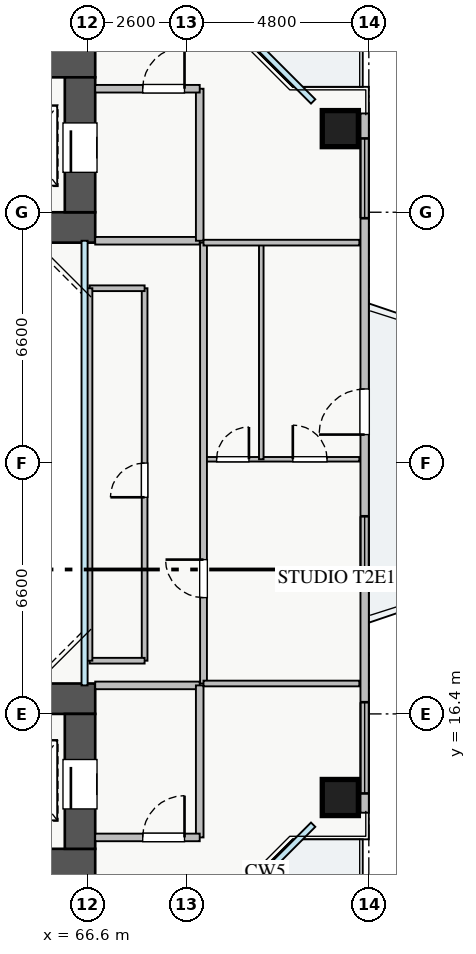
"""IFC4 building model, lengths in metres.
Left out: names, types, materials, properties, quantities, classifications, styles, units other than length and angle.
Written with IfcOpenShell. Run it as: python <this file> out.ifc"""

import sys

from ifc_helpers import new_model, si_unit, direction, frame, frame_2d, origin, origin_2d, place, context, subcontext, project, spatial, rectangle, extrude, source, transform, mapped, element, fill, save


model = new_model("IFC4")
c1 = context("Model", 3, precision=1e-05, world=origin(), true_north=direction((0.0, 1.0)))
c2 = subcontext(c1, "Body", "Model", "MODEL_VIEW")
j1 = project(units=[si_unit("LENGTHUNIT", "METRE"), si_unit("PLANEANGLEUNIT", "RADIAN")], contexts=[c1])
p1 = place(None, origin())
s1 = spatial("IfcSite", under=j1, at=p1, CompositionType="ELEMENT")
p2 = place(p1, origin())
s2 = spatial("IfcBuilding", under=s1, at=p2, CompositionType="ELEMENT")
p3 = place(p2, frame((0.0, 0.0, 23.0)))
s3 = spatial("IfcBuildingStorey", under=s2, at=p3, CompositionType="ELEMENT", Elevation=23.0)
p4 = place(p3, frame((54.2, 29.2, 0.0), z_axis=(0.0, 0.0, 1.0), x_axis=(1.0, 0.0, 0.0)))
e1 = element("IfcWall", 1, at=p4, inside=s3, PredefinedType="SHEAR", context=c2, shape_type="SweptSolid", body=[
    extrude(rectangle(XDim=12.6, YDim=0.8, at=frame_2d((6.3, 0.0))), origin(), (0.0, 0.0, 1.0), 3.25),
])
p5 = place(p3, frame((54.2, 33.55, 0.0), z_axis=(0.0, 0.0, 1.0), x_axis=(1.0, 0.0, 0.0)))
e2 = element("IfcWall", 2, at=p5, inside=s3, PredefinedType="SHEAR", context=c2, shape_type="SweptSolid", body=[
    extrude(rectangle(XDim=12.6, YDim=0.8, at=frame_2d((6.3, 0.0))), origin(), (0.0, 0.0, 1.0), 3.25),
])
p6 = place(p5, frame((8.2, 0.0, 0.0)))
e3 = element("IfcOpeningElement", 3, at=p6, cuts=e2, PredefinedType="OPENING", context=c2, shape_type="SweptSolid", body=[
    extrude(rectangle(XDim=1.1, YDim=2.05, at=frame_2d((0.55, 1.025))), frame((0.0, 0.41, 0.0), z_axis=(0.0, -1.0, 0.0), x_axis=(1.0, 0.0, 0.0)), (0.0, 0.0, 1.0), 0.82),
])
p7 = place(p3, frame((66.4, 29.6, 0.0), z_axis=(0.0, 0.0, 1.0), x_axis=(0.0, 1.0, 0.0)))
e4 = element("IfcWall", 4, at=p7, inside=s3, PredefinedType="SHEAR", context=c2, shape_type="SweptSolid", body=[
    extrude(rectangle(XDim=3.55, YDim=0.8, at=frame_2d((1.775, 0.0))), origin(), (0.0, 0.0, 1.0), 3.25),
])
p8 = place(p7, frame((1.05, 0.0, 0.0)))
e5 = element("IfcOpeningElement", 5, at=p8, cuts=e4, PredefinedType="OPENING", context=c2, shape_type="SweptSolid", body=[
    extrude(rectangle(XDim=1.3, YDim=2.05, at=frame_2d((0.65, 1.025))), frame((0.0, 0.41, 0.0), z_axis=(0.0, -1.0, 0.0), x_axis=(1.0, 0.0, 0.0)), (0.0, 0.0, 1.0), 0.82),
])
p9 = place(p3, frame((54.2, 12.45, 0.0), z_axis=(0.0, 0.0, 1.0), x_axis=(1.0, 0.0, 0.0)))
e6 = element("IfcWall", 6, at=p9, inside=s3, PredefinedType="SHEAR", context=c2, shape_type="SweptSolid", body=[
    extrude(rectangle(XDim=12.6, YDim=0.8, at=frame_2d((6.3, 0.0))), origin(), (0.0, 0.0, 1.0), 3.25),
])
p10 = place(p9, frame((8.2, 0.0, 0.0)))
e7 = element("IfcOpeningElement", 7, at=p10, cuts=e6, PredefinedType="OPENING", context=c2, shape_type="SweptSolid", body=[
    extrude(rectangle(XDim=1.1, YDim=2.05, at=frame_2d((0.55, 1.025))), frame((0.0, 0.41, 0.0), z_axis=(0.0, -1.0, 0.0), x_axis=(1.0, 0.0, 0.0)), (0.0, 0.0, 1.0), 0.82),
])
p11 = place(p3, frame((54.2, 16.8, 0.0), z_axis=(0.0, 0.0, 1.0), x_axis=(1.0, 0.0, 0.0)))
e8 = element("IfcWall", 8, at=p11, inside=s3, PredefinedType="SHEAR", context=c2, shape_type="SweptSolid", body=[
    extrude(rectangle(XDim=12.6, YDim=0.8, at=frame_2d((6.3, 0.0))), origin(), (0.0, 0.0, 1.0), 3.25),
])
p12 = place(p3, frame((66.4, 12.85, 0.0), z_axis=(0.0, 0.0, 1.0), x_axis=(0.0, 1.0, 0.0)))
e9 = element("IfcWall", 9, at=p12, inside=s3, PredefinedType="SHEAR", context=c2, shape_type="SweptSolid", body=[
    extrude(rectangle(XDim=3.55, YDim=0.8, at=frame_2d((1.775, 0.0))), origin(), (0.0, 0.0, 1.0), 3.25),
])
p13 = place(p12, frame((1.05, 0.0, 0.0)))
e10 = element("IfcOpeningElement", 10, at=p13, cuts=e9, PredefinedType="OPENING", context=c2, shape_type="SweptSolid", body=[
    extrude(rectangle(XDim=1.3, YDim=2.05, at=frame_2d((0.65, 1.025))), frame((0.0, 0.41, 0.0), z_axis=(0.0, -1.0, 0.0), x_axis=(1.0, 0.0, 0.0)), (0.0, 0.0, 1.0), 0.82),
])
m1 = source(origin(), c2, "Body", "SweptSolid", [
    extrude(rectangle(XDim=0.95, YDim=0.95, at=origin_2d()), origin(), (0.0, 0.0, 1.0), 3.25),
])
for number, where, z_axis, x_axis in (
    (11, (73.25, 14.2, 0.0), (0.0, 0.0, 1.0), (1.0, 0.0, 0.0)),
    (12, (73.25, 31.8, 0.0), (0.0, 0.0, 1.0), (1.0, 0.0, 0.0)),
):
    element("IfcColumn", number, at=place(p3, frame(where, z_axis=z_axis, x_axis=x_axis)), inside=s3, PredefinedType="COLUMN", context=c2, shape_type="MappedRepresentation", body=[
        mapped(m1, transform((0.0, 0.0, 0.0), x_axis=(1.0, 0.0, 0.0), y_axis=(0.0, 1.0, 0.0), z_axis=(0.0, 0.0, 1.0), scale=1.0)),
    ])
p14 = place(p3, frame((73.89, 13.8, 0.0), z_axis=(0.0, 0.0, 1.0), x_axis=(0.0, 1.0, 0.0)))
e13 = element("IfcWall", 13, at=p14, inside=s3, PredefinedType="STANDARD", context=c2, shape_type="SweptSolid", body=[
    extrude(rectangle(XDim=18.4, YDim=0.22, at=frame_2d((9.2, 0.0))), origin(), (0.0, 0.0, 1.0), 2.61),
])
p15 = place(p14, frame((9.95, 0.0, 0.0)))
e14 = element("IfcOpeningElement", 14, at=p15, cuts=e13, PredefinedType="OPENING", context=c2, shape_type="SweptSolid", body=[
    extrude(rectangle(XDim=1.2, YDim=2.1, at=frame_2d((0.6, 1.05))), frame((0.0, 0.12, 0.0), z_axis=(0.0, -1.0, 0.0), x_axis=(1.0, 0.0, 0.0)), (0.0, 0.0, 1.0), 0.24),
])
p16 = place(p14, frame((0.508, 0.0, 0.9)))
e15 = element("IfcOpeningElement", 15, at=p16, cuts=e13, PredefinedType="OPENING", context=c2, shape_type="SweptSolid", body=[
    extrude(rectangle(XDim=2.4, YDim=1.5, at=frame_2d((1.2, 0.75))), frame((0.0, 0.12, 0.0), z_axis=(0.0, -1.0, 0.0), x_axis=(1.0, 0.0, 0.0)), (0.0, 0.0, 1.0), 0.24),
])
p17 = place(p14, frame((6.0, 0.0, 0.9)))
e16 = element("IfcOpeningElement", 16, at=p17, cuts=e13, PredefinedType="OPENING", context=c2, shape_type="SweptSolid", body=[
    extrude(rectangle(XDim=1.8, YDim=1.45, at=frame_2d((0.9, 0.725))), frame((0.0, 0.12, 0.0), z_axis=(0.0, -1.0, 0.0), x_axis=(1.0, 0.0, 0.0)), (0.0, 0.0, 1.0), 0.24),
])
p18 = place(p14, frame((15.643, 0.0, 0.9)))
e17 = element("IfcOpeningElement", 17, at=p18, cuts=e13, PredefinedType="OPENING", context=c2, shape_type="SweptSolid", body=[
    extrude(rectangle(XDim=2.1, YDim=1.5, at=frame_2d((1.05, 0.75))), frame((0.0, 0.12, 0.0), z_axis=(0.0, -1.0, 0.0), x_axis=(1.0, 0.0, 0.0)), (0.0, 0.0, 1.0), 0.24),
])
p19 = place(p3, frame((66.8, 28.85, 0.0), z_axis=(0.0, 0.0, 1.0), x_axis=(1.0, 0.0, 0.0)))
e18 = element("IfcWall", 18, at=p19, inside=s3, PredefinedType="PARTITIONING", context=c2, shape_type="SweptSolid", body=[
    extrude(rectangle(XDim=2.75, YDim=0.2, at=frame_2d((1.375, 0.0))), origin(), (0.0, 0.0, 1.0), 3.07),
])
p20 = place(p3, frame((69.55, 28.85, 0.0), z_axis=(0.0, 0.0, 1.0), x_axis=(0.0, 1.0, 0.0)))
e19 = element("IfcWall", 19, at=p20, inside=s3, PredefinedType="PARTITIONING", context=c2, shape_type="SweptSolid", body=[
    extrude(rectangle(XDim=4.0, YDim=0.2, at=frame_2d((2.0, 0.0))), origin(), (0.0, 0.0, 1.0), 2.615),
])
p21 = place(p3, frame((66.8, 32.85, 0.0), z_axis=(0.0, 0.0, 1.0), x_axis=(1.0, 0.0, 0.0)))
e20 = element("IfcWall", 20, at=p21, inside=s3, PredefinedType="PARTITIONING", context=c2, shape_type="SweptSolid", body=[
    extrude(rectangle(XDim=2.75, YDim=0.2, at=frame_2d((1.375, 0.0))), origin(), (0.0, 0.0, 1.0), 3.07),
])
p22 = place(p21, frame((1.25, 0.0, 0.0)))
e21 = element("IfcOpeningElement", 21, at=p22, cuts=e20, PredefinedType="OPENING", context=c2, shape_type="SweptSolid", body=[
    extrude(rectangle(XDim=1.1, YDim=2.05, at=frame_2d((0.55, 1.025))), frame((0.0, 0.11, 0.0), z_axis=(0.0, -1.0, 0.0), x_axis=(1.0, 0.0, 0.0)), (0.0, 0.0, 1.0), 0.22),
])
p23 = place(p3, frame((66.8, 17.15, 0.0), z_axis=(0.0, 0.0, 1.0), x_axis=(1.0, 0.0, 0.0)))
e22 = element("IfcWall", 22, at=p23, inside=s3, PredefinedType="PARTITIONING", context=c2, shape_type="SweptSolid", body=[
    extrude(rectangle(XDim=2.75, YDim=0.2, at=frame_2d((1.375, 0.0))), origin(), (0.0, 0.0, 1.0), 3.07),
])
p24 = place(p3, frame((69.55, 13.15, 0.0), z_axis=(0.0, 0.0, 1.0), x_axis=(0.0, 1.0, 0.0)))
e23 = element("IfcWall", 23, at=p24, inside=s3, PredefinedType="PARTITIONING", context=c2, shape_type="SweptSolid", body=[
    extrude(rectangle(XDim=4.0, YDim=0.2, at=frame_2d((2.0, 0.0))), origin(), (0.0, 0.0, 1.0), 2.615),
])
p25 = place(p3, frame((66.8, 13.15, 0.0), z_axis=(0.0, 0.0, 1.0), x_axis=(1.0, 0.0, 0.0)))
e24 = element("IfcWall", 24, at=p25, inside=s3, PredefinedType="PARTITIONING", context=c2, shape_type="SweptSolid", body=[
    extrude(rectangle(XDim=2.75, YDim=0.2, at=frame_2d((1.375, 0.0))), origin(), (0.0, 0.0, 1.0), 3.07),
])
p26 = place(p25, frame((1.25, 0.0, 0.0)))
e25 = element("IfcOpeningElement", 25, at=p26, cuts=e24, PredefinedType="OPENING", context=c2, shape_type="SweptSolid", body=[
    extrude(rectangle(XDim=1.1, YDim=2.05, at=frame_2d((0.55, 1.025))), frame((0.0, 0.11, 0.0), z_axis=(0.0, -1.0, 0.0), x_axis=(1.0, 0.0, 0.0)), (0.0, 0.0, 1.0), 0.22),
])
p27 = place(p3, frame((69.65, 23.1, 0.0), z_axis=(0.0, 0.0, 1.0), x_axis=(1.0, 0.0, 0.0)))
e26 = element("IfcWall", 26, at=p27, inside=s3, PredefinedType="PLUMBINGWALL", context=c2, shape_type="SweptSolid", body=[
    extrude(rectangle(XDim=4.1, YDim=0.12, at=frame_2d((2.05, 0.0))), origin(), (0.0, 0.0, 1.0), 2.771),
])
p28 = place(p27, frame((0.345, 0.0, 0.0)))
e27 = element("IfcOpeningElement", 27, at=p28, cuts=e26, PredefinedType="OPENING", context=c2, shape_type="SweptSolid", body=[
    extrude(rectangle(XDim=0.85, YDim=2.05, at=frame_2d((0.425, 1.025))), frame((0.0, 0.07, 0.0), z_axis=(0.0, -1.0, 0.0), x_axis=(1.0, 0.0, 0.0)), (0.0, 0.0, 1.0), 0.14),
])
p29 = place(p27, frame((2.35, 0.0, 0.0)))
e28 = element("IfcOpeningElement", 28, at=p29, cuts=e26, PredefinedType="OPENING", context=c2, shape_type="SweptSolid", body=[
    extrude(rectangle(XDim=0.9, YDim=2.05, at=frame_2d((0.45, 1.025))), frame((0.0, 0.07, 0.0), z_axis=(0.0, -1.0, 0.0), x_axis=(1.0, 0.0, 0.0)), (0.0, 0.0, 1.0), 0.14),
])
p30 = place(p3, frame((71.17, 23.1, 0.0), z_axis=(0.0, 0.0, 1.0), x_axis=(0.0, 1.0, 0.0)))
e29 = element("IfcWall", 29, at=p30, inside=s3, PredefinedType="PLUMBINGWALL", context=c2, shape_type="SweptSolid", body=[
    extrude(rectangle(XDim=5.7, YDim=0.12, at=frame_2d((2.85, 0.0))), origin(), (0.0, 0.0, 1.0), 3.07),
])
p31 = place(p3, frame((69.65, 17.2, 0.0), z_axis=(0.0, 0.0, 1.0), x_axis=(0.0, 1.0, 0.0)))
e30 = element("IfcWall", 30, at=p31, inside=s3, PredefinedType="PARTITIONING", context=c2, shape_type="SweptSolid", body=[
    extrude(rectangle(XDim=11.6, YDim=0.18, at=frame_2d((5.8, 0.0))), origin(), (0.0, 0.0, 1.0), 3.07),
])
p32 = place(p31, frame((2.26, 0.0, 0.0)))
e31 = element("IfcOpeningElement", 31, at=p32, cuts=e30, PredefinedType="OPENING", context=c2, shape_type="SweptSolid", body=[
    extrude(rectangle(XDim=1.0, YDim=2.05, at=frame_2d((0.5, 1.025))), frame((0.0, 0.1, 0.0), z_axis=(0.0, -1.0, 0.0), x_axis=(1.0, 0.0, 0.0)), (0.0, 0.0, 1.0), 0.2),
])
for number, where, z_axis, x_axis in (
    (32, (69.65, 17.2, 0.0), (0.0, 0.0, 1.0), (1.0, 0.0, 0.0)),
    (33, (69.65, 28.8, 0.0), (0.0, 0.0, 1.0), (1.0, 0.0, 0.0)),
):
    element("IfcWall", number, at=place(p3, frame(where, z_axis=z_axis, x_axis=x_axis)), inside=s3, PredefinedType="PARTITIONING", context=c2, shape_type="SweptSolid", body=[
        extrude(rectangle(XDim=4.1, YDim=0.15, at=frame_2d((2.05, 0.0))), origin(), (0.0, 0.0, 1.0), 3.07),
    ])
p33 = place(p3, frame((68.1, 17.8, 0.0), z_axis=(0.0, 0.0, 1.0), x_axis=(0.0, 1.0, 0.0)))
e34 = element("IfcWall", 34, at=p33, inside=s3, PredefinedType="PARTITIONING", context=c2, shape_type="SweptSolid", body=[
    extrude(rectangle(XDim=9.8, YDim=0.15, at=frame_2d((4.9, 0.0))), origin(), (0.0, 0.0, 1.0), 3.07),
])
p34 = place(p33, frame((4.3, 0.0, 0.0)))
e35 = element("IfcOpeningElement", 35, at=p34, cuts=e34, PredefinedType="OPENING", context=c2, shape_type="SweptSolid", body=[
    extrude(rectangle(XDim=0.9, YDim=2.05, at=frame_2d((0.45, 1.025))), frame((0.0, 0.085, 0.0), z_axis=(0.0, -1.0, 0.0), x_axis=(1.0, 0.0, 0.0)), (0.0, 0.0, 1.0), 0.17),
])
p35 = place(p3, frame((66.65, 27.6, 0.0), z_axis=(0.0, 0.0, 1.0), x_axis=(1.0, 0.0, 0.0)))
e36 = element("IfcWall", 36, at=p35, inside=s3, PredefinedType="PARTITIONING", context=c2, shape_type="SweptSolid", body=[
    extrude(rectangle(XDim=1.45, YDim=0.15, at=frame_2d((0.725, 0.0))), origin(), (0.0, 0.0, 1.0), 2.771),
])
p36 = place(p3, frame((66.65, 17.8, 0.0), z_axis=(0.0, 0.0, 1.0), x_axis=(1.0, 0.0, 0.0)))
e37 = element("IfcWall", 37, at=p36, inside=s3, PredefinedType="PARTITIONING", context=c2, shape_type="SweptSolid", body=[
    extrude(rectangle(XDim=1.45, YDim=0.15, at=frame_2d((0.725, 0.0))), origin(), (0.0, 0.0, 1.0), 3.07),
])
p37 = place(p3, frame((66.65, 17.8, 0.0), z_axis=(0.0, 0.0, 1.0), x_axis=(0.0, 1.0, 0.0)))
e38 = element("IfcWall", 38, at=p37, inside=s3, PredefinedType="PARTITIONING", context=c2, shape_type="SweptSolid", body=[
    extrude(rectangle(XDim=9.8, YDim=0.15, at=frame_2d((4.9, 0.0))), origin(), (0.0, 0.0, 1.0), 2.665),
])
m2 = source(origin(), c2, "Body", "SweptSolid", [
    extrude(rectangle(XDim=1.2, YDim=2.1, at=frame_2d((0.6, 1.05))), frame((0.0, 0.025, 0.0), z_axis=(0.0, -1.0, 0.0), x_axis=(1.0, 0.0, 0.0)), (0.0, 0.0, 1.0), 0.05),
])
p38 = place(p15, origin())
e39 = element("IfcDoor", 39, at=p38, inside=s3, OperationType="SINGLE_SWING_LEFT", PredefinedType="DOOR", context=c2, shape_type="MappedRepresentation", body=[
    mapped(m2, transform((0.0, 0.0, 0.0), x_axis=(1.0, 0.0, 0.0), y_axis=(0.0, 1.0, 0.0), z_axis=(0.0, 0.0, 1.0), scale=1.0)),
])
fill(e14, e39)
m3 = source(origin(), c2, "Body", "SweptSolid", [
    extrude(rectangle(XDim=2.4, YDim=1.5, at=frame_2d((1.2, 0.75))), frame((0.0, 0.03, 0.0), z_axis=(0.0, -1.0, 0.0), x_axis=(1.0, 0.0, 0.0)), (0.0, 0.0, 1.0), 0.06),
])
p39 = place(p16, origin())
e40 = element("IfcWindow", 40, at=p39, inside=s3, PartitioningType="TRIPLE_PANEL_VERTICAL", PredefinedType="WINDOW", context=c2, shape_type="MappedRepresentation", body=[
    mapped(m3, transform((0.0, 0.0, 0.0), x_axis=(1.0, 0.0, 0.0), y_axis=(0.0, 1.0, 0.0), z_axis=(0.0, 0.0, 1.0), scale=1.0)),
])
fill(e15, e40)
m4 = source(origin(), c2, "Body", "SweptSolid", [
    extrude(rectangle(XDim=1.8, YDim=1.45, at=frame_2d((0.9, 0.725))), frame((0.0, 0.03, 0.0), z_axis=(0.0, -1.0, 0.0), x_axis=(1.0, 0.0, 0.0)), (0.0, 0.0, 1.0), 0.06),
])
p40 = place(p17, origin())
e41 = element("IfcWindow", 41, at=p40, inside=s3, PartitioningType="DOUBLE_PANEL_VERTICAL", PredefinedType="WINDOW", context=c2, shape_type="MappedRepresentation", body=[
    mapped(m4, transform((0.0, 0.0, 0.0), x_axis=(1.0, 0.0, 0.0), y_axis=(0.0, 1.0, 0.0), z_axis=(0.0, 0.0, 1.0), scale=1.0)),
])
fill(e16, e41)
m5 = source(origin(), c2, "Body", "SweptSolid", [
    extrude(rectangle(XDim=2.1, YDim=1.5, at=frame_2d((1.05, 0.75))), frame((0.0, 0.03, 0.0), z_axis=(0.0, -1.0, 0.0), x_axis=(1.0, 0.0, 0.0)), (0.0, 0.0, 1.0), 0.06),
])
p41 = place(p18, origin())
e42 = element("IfcWindow", 42, at=p41, inside=s3, PartitioningType="TRIPLE_PANEL_VERTICAL", PredefinedType="WINDOW", context=c2, shape_type="MappedRepresentation", body=[
    mapped(m5, transform((0.0, 0.0, 0.0), x_axis=(1.0, 0.0, 0.0), y_axis=(0.0, 1.0, 0.0), z_axis=(0.0, 0.0, 1.0), scale=1.0)),
])
fill(e17, e42)
m6 = source(origin(), c2, "Body", "SweptSolid", [
    extrude(rectangle(XDim=1.3, YDim=2.05, at=frame_2d((0.65, 1.025))), frame((0.0, 0.025, 0.0), z_axis=(0.0, -1.0, 0.0), x_axis=(1.0, 0.0, 0.0)), (0.0, 0.0, 1.0), 0.05),
])
p42 = place(p8, origin())
e43 = element("IfcDoor", 43, at=p42, inside=s3, OperationType="SLIDING_TO_LEFT", PredefinedType="DOOR", context=c2, shape_type="MappedRepresentation", body=[
    mapped(m6, transform((0.0, 0.0, 0.0), x_axis=(1.0, 0.0, 0.0), y_axis=(0.0, 1.0, 0.0), z_axis=(0.0, 0.0, 1.0), scale=1.0)),
])
fill(e5, e43)
p43 = place(p13, origin())
e44 = element("IfcDoor", 44, at=p43, inside=s3, OperationType="SLIDING_TO_RIGHT", PredefinedType="DOOR", context=c2, shape_type="MappedRepresentation", body=[
    mapped(m6, transform((0.0, 0.0, 0.0), x_axis=(1.0, 0.0, 0.0), y_axis=(0.0, 1.0, 0.0), z_axis=(0.0, 0.0, 1.0), scale=1.0)),
])
fill(e10, e44)
m7 = source(origin(), c2, "Body", "SweptSolid", [
    extrude(rectangle(XDim=1.1, YDim=2.05, at=frame_2d((0.55, 1.025))), frame((0.0, 0.025, 0.0), z_axis=(0.0, -1.0, 0.0), x_axis=(1.0, 0.0, 0.0)), (0.0, 0.0, 1.0), 0.05),
])
p44 = place(p22, origin())
e45 = element("IfcDoor", 45, at=p44, inside=s3, OperationType="SINGLE_SWING_RIGHT", PredefinedType="DOOR", context=c2, shape_type="MappedRepresentation", body=[
    mapped(m7, transform((0.0, 0.0, 0.0), x_axis=(1.0, 0.0, 0.0), y_axis=(0.0, 1.0, 0.0), z_axis=(0.0, 0.0, 1.0), scale=1.0)),
])
fill(e21, e45)
p45 = place(p26, origin())
e46 = element("IfcDoor", 46, at=p45, inside=s3, OperationType="SINGLE_SWING_RIGHT", PredefinedType="DOOR", context=c2, shape_type="MappedRepresentation", body=[
    mapped(m7, transform((0.0, 0.0, 0.0), x_axis=(1.0, 0.0, 0.0), y_axis=(0.0, 1.0, 0.0), z_axis=(0.0, 0.0, 1.0), scale=1.0)),
])
fill(e25, e46)
m8 = source(origin(), c2, "Body", "SweptSolid", [
    extrude(rectangle(XDim=0.85, YDim=2.05, at=frame_2d((0.425, 1.025))), frame((0.0, 0.025, 0.0), z_axis=(0.0, -1.0, 0.0), x_axis=(1.0, 0.0, 0.0)), (0.0, 0.0, 1.0), 0.05),
])
p46 = place(p28, origin())
e47 = element("IfcDoor", 47, at=p46, inside=s3, OperationType="SINGLE_SWING_RIGHT", PredefinedType="DOOR", context=c2, shape_type="MappedRepresentation", body=[
    mapped(m8, transform((0.0, 0.0, 0.0), x_axis=(1.0, 0.0, 0.0), y_axis=(0.0, 1.0, 0.0), z_axis=(0.0, 0.0, 1.0), scale=1.0)),
])
fill(e27, e47)
m9 = source(origin(), c2, "Body", "SweptSolid", [
    extrude(rectangle(XDim=0.9, YDim=2.05, at=frame_2d((0.45, 1.025))), frame((0.0, 0.025, 0.0), z_axis=(0.0, -1.0, 0.0), x_axis=(1.0, 0.0, 0.0)), (0.0, 0.0, 1.0), 0.05),
])
p47 = place(p29, origin())
e48 = element("IfcDoor", 48, at=p47, inside=s3, OperationType="SINGLE_SWING_LEFT", PredefinedType="DOOR", context=c2, shape_type="MappedRepresentation", body=[
    mapped(m9, transform((0.0, 0.0, 0.0), x_axis=(1.0, 0.0, 0.0), y_axis=(0.0, 1.0, 0.0), z_axis=(0.0, 0.0, 1.0), scale=1.0)),
])
fill(e28, e48)
m10 = source(origin(), c2, "Body", "SweptSolid", [
    extrude(rectangle(XDim=1.0, YDim=2.05, at=frame_2d((0.5, 1.025))), frame((0.0, 0.025, 0.0), z_axis=(0.0, -1.0, 0.0), x_axis=(1.0, 0.0, 0.0)), (0.0, 0.0, 1.0), 0.05),
])
p48 = place(p32, origin())
e49 = element("IfcDoor", 49, at=p48, inside=s3, OperationType="SINGLE_SWING_RIGHT", PredefinedType="DOOR", context=c2, shape_type="MappedRepresentation", body=[
    mapped(m10, transform((0.0, 0.0, 0.0), x_axis=(1.0, 0.0, 0.0), y_axis=(0.0, 1.0, 0.0), z_axis=(0.0, 0.0, 1.0), scale=1.0)),
])
fill(e31, e49)
p49 = place(p34, origin())
e50 = element("IfcDoor", 50, at=p49, inside=s3, OperationType="SINGLE_SWING_LEFT", PredefinedType="DOOR", context=c2, shape_type="MappedRepresentation", body=[
    mapped(m9, transform((0.0, 0.0, 0.0), x_axis=(1.0, 0.0, 0.0), y_axis=(0.0, 1.0, 0.0), z_axis=(0.0, 0.0, 1.0), scale=1.0)),
])
fill(e35, e50)
save(model, sys.argv[1])
